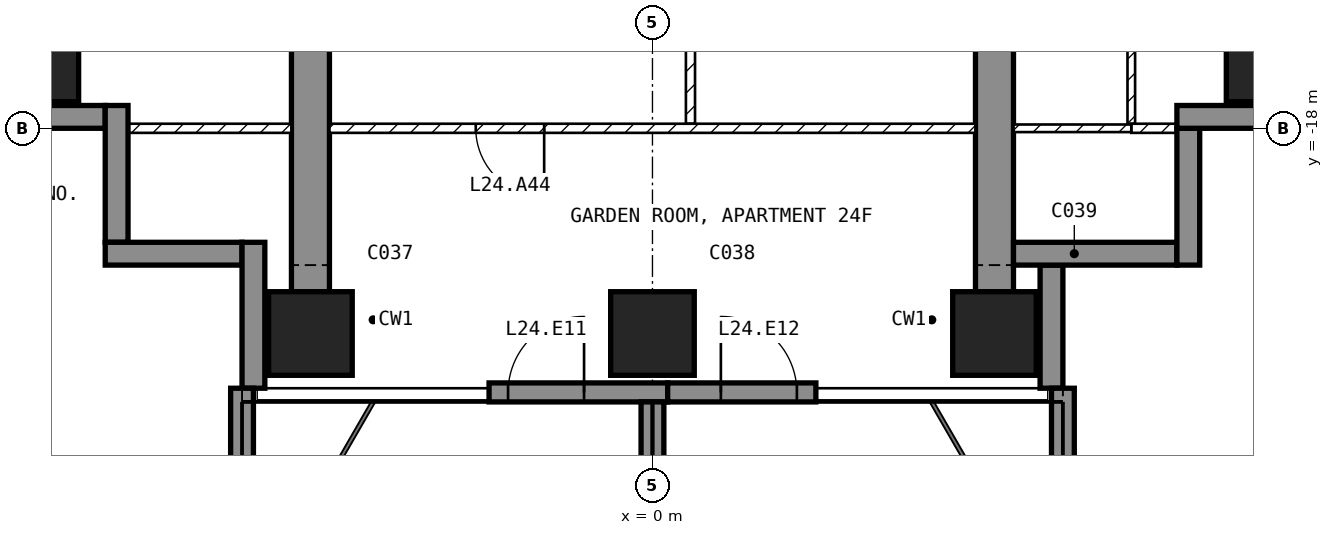
"""IFC4 building model, lengths in metres.
Left out: names, types, materials, properties, quantities, classifications, styles, units other than length and angle.
Written with IfcOpenShell. Run it as: python <this file> out.ifc"""

import sys

from ifc_helpers import new_model, si_unit, direction, frame, frame_2d, origin, origin_2d, place, context, subcontext, project, spatial, polyline, rectangle, outline, extrude, element, fill, save


model = new_model("IFC4")
c1 = context("Model", 3, precision=1e-05, world=origin(), true_north=direction((0.0, 1.0)))
c2 = subcontext(c1, "Body", "Model", "MODEL_VIEW")
j1 = project(units=[si_unit("LENGTHUNIT", "METRE"), si_unit("PLANEANGLEUNIT", "RADIAN")], contexts=[c1])
p1 = place(None, origin())
s1 = spatial("IfcSite", under=j1, at=p1, CompositionType="ELEMENT")
p2 = place(p1, origin())
s2 = spatial("IfcBuilding", under=s1, at=p2, CompositionType="ELEMENT")
p3 = place(p2, frame((0.0, 0.0, 105.9)))
s3 = spatial("IfcBuildingStorey", under=s2, at=p3, CompositionType="ELEMENT", Elevation=105.9)
for number, where, z_axis, x_axis in (
    (1, (-8.1, -17.1, -0.25), (0.0, 0.0, 1.0), (1.0, 0.0, 0.0)),
    (2, (-4.5, -20.7, -0.25), (0.0, 0.0, 1.0), (1.0, 0.0, 0.0)),
    (3, (0.0, -20.7, -0.25), (0.0, 0.0, 1.0), (1.0, 0.0, 0.0)),
    (4, (4.5, -20.7, -0.25), (0.0, 0.0, 1.0), (1.0, 0.0, 0.0)),
    (5, (8.1, -17.1, -0.25), (0.0, 0.0, 1.0), (1.0, 0.0, 0.0)),
):
    element("IfcColumn", number, at=place(p3, frame(where, z_axis=z_axis, x_axis=x_axis)), inside=s3, PredefinedType="COLUMN", context=c2, shape_type="SweptSolid", body=[
        extrude(rectangle(XDim=1.1, YDim=1.1, at=origin_2d()), origin(), (0.0, 0.0, 1.0), 3.5),
    ])
for number, where, z_axis, x_axis in (
    (6, (-4.75, -20.15, -0.25), (1.0, 0.0, 0.0), (0.0, 1.0, 0.0)),
    (7, (4.25, -20.15, -0.25), (1.0, 0.0, 0.0), (0.0, 1.0, 0.0)),
):
    element("IfcWall", number, at=place(p3, frame(where, z_axis=z_axis, x_axis=x_axis)), inside=s3, PredefinedType="SHEAR", context=c2, shape_type="SweptSolid", body=[
        extrude(outline(polyline([(0.0, 0.0), (6.65, 0.0), (6.65, 2.65), (9.05, 2.65), (9.05, 0.0), (11.15, 0.0), (11.15, 3.5), (0.0, 3.5), (0.0, 0.0)])), origin(), (0.0, 0.0, 1.0), 0.5),
    ])
p4 = place(p3, frame((-2.15, -21.475, 0.0), z_axis=(0.0, 0.0, 1.0), x_axis=(1.0, 0.0, 0.0)))
e8 = element("IfcWall", 8, at=p4, inside=s3, PredefinedType="SOLIDWALL", context=c2, shape_type="SweptSolid", body=[
    extrude(rectangle(XDim=2.35, YDim=0.25, at=frame_2d((1.175, 0.0))), origin(), (0.0, 0.0, 1.0), 3.25),
])
p5 = place(p4, frame((0.25, 0.0, 0.0)))
e9 = element("IfcOpeningElement", 9, at=p5, cuts=e8, PredefinedType="OPENING", context=c2, shape_type="SweptSolid", body=[
    extrude(rectangle(XDim=1.0, YDim=2.4, at=frame_2d((0.5, 1.2))), frame((0.0, 0.135, 0.0), z_axis=(0.0, -1.0, 0.0), x_axis=(1.0, 0.0, 0.0)), (0.0, 0.0, 1.0), 0.27),
])
p6 = place(p3, frame((0.2, -21.475, 0.0), z_axis=(0.0, 0.0, 1.0), x_axis=(1.0, 0.0, 0.0)))
e10 = element("IfcWall", 10, at=p6, inside=s3, PredefinedType="SOLIDWALL", context=c2, shape_type="SweptSolid", body=[
    extrude(rectangle(XDim=1.95, YDim=0.25, at=frame_2d((0.975, 0.0))), origin(), (0.0, 0.0, 1.0), 3.25),
])
p7 = place(p6, frame((0.7, 0.0, 0.0)))
e11 = element("IfcOpeningElement", 11, at=p7, cuts=e10, PredefinedType="OPENING", context=c2, shape_type="SweptSolid", body=[
    extrude(rectangle(XDim=1.0, YDim=2.4, at=frame_2d((0.5, 1.2))), frame((0.0, 0.135, 0.0), z_axis=(0.0, -1.0, 0.0), x_axis=(1.0, 0.0, 0.0)), (0.0, 0.0, 1.0), 0.27),
])
p8 = place(p3, frame((5.25, -21.42, 0.0), z_axis=(0.0, 0.0, 1.0), x_axis=(0.0, 1.0, 0.0)))
e12 = element("IfcWall", 12, at=p8, inside=s3, PredefinedType="SOLIDWALL", context=c2, shape_type="SweptSolid", body=[
    extrude(rectangle(XDim=1.62, YDim=0.3, at=frame_2d((0.81, 0.0))), origin(), (0.0, 0.0, 1.0), 3.25),
])
p9 = place(p3, frame((4.75, -19.65, 0.0), z_axis=(0.0, 0.0, 1.0), x_axis=(1.0, 0.0, 0.0)))
e13 = element("IfcWall", 13, at=p9, inside=s3, PredefinedType="SOLIDWALL", context=c2, shape_type="SweptSolid", body=[
    extrude(rectangle(XDim=2.15, YDim=0.3, at=frame_2d((1.075, 0.0))), origin(), (0.0, 0.0, 1.0), 3.25),
])
p10 = place(p3, frame((7.05, -19.8, 0.0), z_axis=(0.0, 0.0, 1.0), x_axis=(0.0, 1.0, 0.0)))
e14 = element("IfcWall", 14, at=p10, inside=s3, PredefinedType="SOLIDWALL", context=c2, shape_type="SweptSolid", body=[
    extrude(rectangle(XDim=1.8, YDim=0.3, at=frame_2d((0.9, 0.0))), origin(), (0.0, 0.0, 1.0), 3.25),
])
p11 = place(p3, frame((6.9, -17.85, 0.0), z_axis=(0.0, 0.0, 1.0), x_axis=(1.0, 0.0, 0.0)))
e15 = element("IfcWall", 15, at=p11, inside=s3, PredefinedType="SOLIDWALL", context=c2, shape_type="SweptSolid", body=[
    extrude(rectangle(XDim=1.85, YDim=0.3, at=frame_2d((0.925, 0.0))), origin(), (0.0, 0.0, 1.0), 3.25),
])
p12 = place(p3, frame((-8.75, -17.85, 0.0), z_axis=(0.0, 0.0, 1.0), x_axis=(1.0, 0.0, 0.0)))
e16 = element("IfcWall", 16, at=p12, inside=s3, PredefinedType="SOLIDWALL", context=c2, shape_type="SweptSolid", body=[
    extrude(rectangle(XDim=1.55, YDim=0.3, at=frame_2d((0.775, 0.0))), origin(), (0.0, 0.0, 1.0), 3.25),
])
for number, where, z_axis, x_axis in (
    (17, (-7.05, -17.7, 0.0), (0.0, 0.0, 1.0), (0.0, -1.0, 0.0)),
    (18, (-7.2, -19.65, 0.0), (0.0, 0.0, 1.0), (1.0, 0.0, 0.0)),
):
    element("IfcWall", number, at=place(p3, frame(where, z_axis=z_axis, x_axis=x_axis)), inside=s3, PredefinedType="SOLIDWALL", context=c2, shape_type="SweptSolid", body=[
        extrude(rectangle(XDim=1.8, YDim=0.3, at=frame_2d((0.9, 0.0))), origin(), (0.0, 0.0, 1.0), 3.25),
    ])
p13 = place(p3, frame((-5.25, -19.5, 0.0), z_axis=(0.0, 0.0, 1.0), x_axis=(0.0, -1.0, 0.0)))
e19 = element("IfcWall", 19, at=p13, inside=s3, PredefinedType="SOLIDWALL", context=c2, shape_type="SweptSolid", body=[
    extrude(rectangle(XDim=1.92, YDim=0.3, at=frame_2d((0.96, 0.0))), origin(), (0.0, 0.0, 1.0), 3.25),
])
p14 = place(p3, frame((-5.4, -21.42, 0.0), z_axis=(0.0, 0.0, 1.0), x_axis=(0.0, -1.0, 0.0)))
e20 = element("IfcWall", 20, at=p14, inside=s3, PredefinedType="SOLIDWALL", context=c2, shape_type="SweptSolid", body=[
    extrude(rectangle(XDim=2.88, YDim=0.3, at=frame_2d((1.44, 0.0))), origin(), (0.0, 0.0, 1.0), 3.25),
])
p15 = place(p3, frame((0.0, -21.6, 0.0), z_axis=(0.0, 0.0, 1.0), x_axis=(0.0, -1.0, 0.0)))
e21 = element("IfcWall", 21, at=p15, inside=s3, PredefinedType="SOLIDWALL", context=c2, shape_type="SweptSolid", body=[
    extrude(rectangle(XDim=2.7, YDim=0.3, at=frame_2d((1.35, 0.0))), origin(), (0.0, 0.0, 1.0), 3.25),
])
p16 = place(p3, frame((5.4, -21.42, 0.0), z_axis=(0.0, 0.0, 1.0), x_axis=(0.0, -1.0, 0.0)))
e22 = element("IfcWall", 22, at=p16, inside=s3, PredefinedType="SOLIDWALL", context=c2, shape_type="SweptSolid", body=[
    extrude(rectangle(XDim=2.88, YDim=0.3, at=frame_2d((1.44, 0.0))), origin(), (0.0, 0.0, 1.0), 3.25),
])
p17 = place(p3, frame((0.5, -15.06, 0.0), z_axis=(0.0, 0.0, 1.0), x_axis=(0.0, -1.0, 0.0)))
e23 = element("IfcWall", 23, at=p17, inside=s3, PredefinedType="PARTITIONING", context=c2, shape_type="SweptSolid", body=[
    extrude(rectangle(XDim=2.88, YDim=0.12, at=frame_2d((1.44, 0.0))), origin(), (0.0, 0.0, 1.0), 3.25),
])
p18 = place(p3, frame((4.25, -18.0, 0.0), z_axis=(0.0, 0.0, 1.0), x_axis=(-1.0, 0.0, 0.0)))
e24 = element("IfcWall", 24, at=p18, inside=s3, PredefinedType="PARTITIONING", context=c2, shape_type="SweptSolid", body=[
    extrude(rectangle(XDim=8.5, YDim=0.12, at=frame_2d((4.25, 0.0))), origin(), (0.0, 0.0, 1.0), 3.25),
])
p19 = place(p18, frame((5.675, 0.0, 0.0)))
e25 = element("IfcOpeningElement", 25, at=p19, cuts=e24, PredefinedType="OPENING", context=c2, shape_type="SweptSolid", body=[
    extrude(rectangle(XDim=0.9, YDim=2.1, at=frame_2d((0.45, 1.05))), frame((0.0, 0.07, 0.0), z_axis=(0.0, -1.0, 0.0), x_axis=(1.0, 0.0, 0.0)), (0.0, 0.0, 1.0), 0.14),
])
p20 = place(p3, frame((6.3, -17.94, 0.0), z_axis=(0.0, 0.0, 1.0), x_axis=(0.0, 1.0, 0.0)))
e26 = element("IfcWall", 26, at=p20, inside=s3, PredefinedType="PARTITIONING", context=c2, shape_type="SweptSolid", body=[
    extrude(rectangle(XDim=3.49, YDim=0.1, at=frame_2d((1.745, 0.0))), origin(), (0.0, 0.0, 1.0), 3.25),
])
p21 = place(p20, frame((1.32, 0.0, 0.0)))
e27 = element("IfcOpeningElement", 27, at=p21, cuts=e26, PredefinedType="OPENING", context=c2, shape_type="SweptSolid", body=[
    extrude(rectangle(XDim=0.85, YDim=2.1, at=frame_2d((0.425, 1.05))), frame((0.0, 0.06, 0.0), z_axis=(0.0, -1.0, 0.0), x_axis=(1.0, 0.0, 0.0)), (0.0, 0.0, 1.0), 0.12),
])
p22 = place(p3, frame((7.12, -18.0, 0.0), z_axis=(0.0, 0.0, 1.0), x_axis=(-1.0, 0.0, 0.0)))
e28 = element("IfcWall", 28, at=p22, inside=s3, PredefinedType="PARTITIONING", context=c2, shape_type="SweptSolid", body=[
    extrude(rectangle(XDim=0.82, YDim=0.12, at=frame_2d((0.41, 0.0))), origin(), (0.0, 0.0, 1.0), 3.25),
])
p23 = place(p3, frame((6.3, -18.0, 0.0), z_axis=(0.0, 0.0, 1.0), x_axis=(-1.0, 0.0, 0.0)))
e29 = element("IfcWall", 29, at=p23, inside=s3, PredefinedType="PARTITIONING", context=c2, shape_type="SweptSolid", body=[
    extrude(rectangle(XDim=1.55, YDim=0.1, at=frame_2d((0.775, 0.0))), origin(), (0.0, 0.0, 1.0), 3.25),
])
p24 = place(p3, frame((-4.75, -18.0, 0.0), z_axis=(0.0, 0.0, 1.0), x_axis=(-1.0, 0.0, 0.0)))
e30 = element("IfcWall", 30, at=p24, inside=s3, PredefinedType="PARTITIONING", context=c2, shape_type="SweptSolid", body=[
    extrude(rectangle(XDim=2.37, YDim=0.12, at=frame_2d((1.185, 0.0))), origin(), (0.0, 0.0, 1.0), 3.25),
])
p25 = place(p5, origin())
e31 = element("IfcDoor", 31, at=p25, inside=s3, OperationType="SINGLE_SWING_RIGHT", PredefinedType="DOOR", context=c2, shape_type="SweptSolid", body=[
    extrude(rectangle(XDim=1.0, YDim=2.4, at=frame_2d((0.5, 1.2))), frame((0.0, 0.025, 0.0), z_axis=(0.0, -1.0, 0.0), x_axis=(1.0, 0.0, 0.0)), (0.0, 0.0, 1.0), 0.05),
])
fill(e9, e31)
p26 = place(p7, origin())
e32 = element("IfcDoor", 32, at=p26, inside=s3, OperationType="SINGLE_SWING_LEFT", PredefinedType="DOOR", context=c2, shape_type="SweptSolid", body=[
    extrude(rectangle(XDim=1.0, YDim=2.4, at=frame_2d((0.5, 1.2))), frame((0.0, 0.025, 0.0), z_axis=(0.0, -1.0, 0.0), x_axis=(1.0, 0.0, 0.0)), (0.0, 0.0, 1.0), 0.05),
])
fill(e11, e32)
p27 = place(p19, origin())
e33 = element("IfcDoor", 33, at=p27, inside=s3, OperationType="SINGLE_SWING_LEFT", PredefinedType="DOOR", context=c2, shape_type="SweptSolid", body=[
    extrude(rectangle(XDim=0.9, YDim=2.1, at=frame_2d((0.45, 1.05))), frame((0.0, 0.025, 0.0), z_axis=(0.0, -1.0, 0.0), x_axis=(1.0, 0.0, 0.0)), (0.0, 0.0, 1.0), 0.05),
])
fill(e25, e33)
save(model, sys.argv[1])
